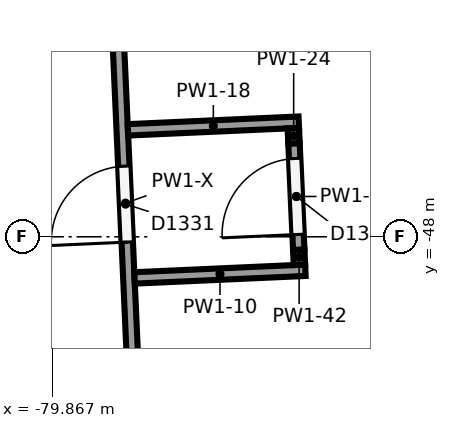
"""IFC4 building model, lengths in metres.
Left out: names, types, materials, properties, quantities, classifications, styles, units other than length and angle.
Written with IfcOpenShell. Run it as: python <this file> out.ifc"""

import sys

from ifc_helpers import new_model, si_unit, direction, frame, frame_2d, origin, place, context, subcontext, project, spatial, rectangle, extrude, element, fill, save


model = new_model("IFC4")
c1 = context("Model", 3, precision=1e-05, world=origin(), true_north=direction((0.0, 1.0)))
c2 = subcontext(c1, "Body", "Model", "MODEL_VIEW")
j1 = project(units=[si_unit("LENGTHUNIT", "METRE"), si_unit("PLANEANGLEUNIT", "RADIAN")], contexts=[c1])
p1 = place(None, origin())
s1 = spatial("IfcSite", under=j1, at=p1, CompositionType="ELEMENT")
p2 = place(p1, origin())
s2 = spatial("IfcBuilding", under=s1, at=p2, CompositionType="ELEMENT")
p3 = place(p2, frame((0.0, 0.0, 18.0)))
s3 = spatial("IfcBuildingStorey", under=s2, at=p3, CompositionType="ELEMENT", Elevation=18.0)
p4 = place(p3, frame((-78.691, -52.266, 0.0), z_axis=(0.0, 0.0, 1.0), x_axis=(-0.044749816806, 0.998998225172, 0.0)))
e1 = element("IfcWall", 1, at=p4, inside=s3, PredefinedType="PARTITIONING", context=c2, shape_type="SweptSolid", body=[
    extrude(rectangle(XDim=9.427, YDim=0.15, at=frame_2d((4.714, 0.0))), origin(), (0.0, 0.0, 1.0), 3.332),
])
p5 = place(p4, frame((4.2, 0.0, 0.0)))
e2 = element("IfcOpeningElement", 2, at=p5, cuts=e1, PredefinedType="OPENING", context=c2, shape_type="SweptSolid", body=[
    extrude(rectangle(XDim=1.0, YDim=2.1, at=frame_2d((0.5, 1.05))), frame((0.0, 0.085, 0.0), z_axis=(0.0, -1.0, 0.0), x_axis=(1.0, 0.0, 0.0)), (0.0, 0.0, 1.0), 0.17),
])
p6 = place(p3, frame((-78.783, -48.541, 0.0), z_axis=(0.0, 0.0, 1.0), x_axis=(0.998995432738, 0.044812111841, 0.0)))
e3 = element("IfcWall", 3, at=p6, inside=s3, PredefinedType="PARTITIONING", context=c2, shape_type="SweptSolid", body=[
    extrude(rectangle(XDim=2.25, YDim=0.15, at=frame_2d((1.125, 0.0))), origin(), (0.0, 0.0, 1.0), 5.691),
])
p7 = place(p3, frame((-78.871, -46.593, 0.0), z_axis=(0.0, 0.0, 1.0), x_axis=(0.999000284298, 0.044703825039, 0.0)))
e4 = element("IfcWall", 4, at=p7, inside=s3, PredefinedType="PARTITIONING", context=c2, shape_type="SweptSolid", body=[
    extrude(rectangle(XDim=2.25, YDim=0.15, at=frame_2d((1.125, 0.0))), origin(), (0.0, 0.0, 1.0), 5.601),
])
p8 = place(p3, frame((-76.614, -48.369, 0.0), z_axis=(0.0, 0.0, 1.0), x_axis=(-0.04518607304, 0.99897858776, 0.0)))
e5 = element("IfcWall", 5, at=p8, inside=s3, PredefinedType="PARTITIONING", context=c2, shape_type="SweptSolid", body=[
    extrude(rectangle(XDim=0.2, YDim=0.15, at=frame_2d((0.1, 0.0))), origin(), (0.0, 0.0, 1.0), 5.698),
])
p9 = place(p3, frame((-76.623, -48.169, 0.0), z_axis=(0.0, 0.0, 1.0), x_axis=(-0.044640390809, 0.99900312087, 0.0)))
e6 = element("IfcWall", 6, at=p9, inside=s3, PredefinedType="PARTITIONING", context=c2, shape_type="SweptSolid", body=[
    extrude(rectangle(XDim=1.4, YDim=0.15, at=frame_2d((0.7, 0.0))), origin(), (0.0, 0.0, 1.0), 5.661),
])
p10 = place(p9, frame((0.2, 0.0, 0.0)))
e7 = element("IfcOpeningElement", 7, at=p10, cuts=e6, PredefinedType="OPENING", context=c2, shape_type="SweptSolid", body=[
    extrude(rectangle(XDim=1.0, YDim=2.1, at=frame_2d((0.5, 1.05))), frame((0.0, 0.085, 0.0), z_axis=(0.0, -1.0, 0.0), x_axis=(1.0, 0.0, 0.0)), (0.0, 0.0, 1.0), 0.17),
])
p11 = place(p3, frame((-76.685, -46.771, 0.0), z_axis=(0.0, 0.0, 1.0), x_axis=(-0.04518607304, 0.99897858776, 0.0)))
e8 = element("IfcWall", 8, at=p11, inside=s3, PredefinedType="PARTITIONING", context=c2, shape_type="SweptSolid", body=[
    extrude(rectangle(XDim=0.2, YDim=0.15, at=frame_2d((0.1, 0.0))), origin(), (0.0, 0.0, 1.0), 5.651),
])
p12 = place(p5, origin())
e9 = element("IfcDoor", 9, at=p12, inside=s3, OperationType="SINGLE_SWING_LEFT", PredefinedType="DOOR", context=c2, shape_type="SweptSolid", body=[
    extrude(rectangle(XDim=1.0, YDim=2.1, at=frame_2d((0.5, 1.05))), frame((0.0, 0.025, 0.0), z_axis=(0.0, -1.0, 0.0), x_axis=(1.0, 0.0, 0.0)), (0.0, 0.0, 1.0), 0.05),
])
fill(e2, e9)
p13 = place(p10, origin())
e10 = element("IfcDoor", 10, at=p13, inside=s3, OperationType="SINGLE_SWING_LEFT", PredefinedType="DOOR", context=c2, shape_type="SweptSolid", body=[
    extrude(rectangle(XDim=1.0, YDim=2.1, at=frame_2d((0.5, 1.05))), frame((0.0, 0.025, 0.0), z_axis=(0.0, -1.0, 0.0), x_axis=(1.0, 0.0, 0.0)), (0.0, 0.0, 1.0), 0.05),
])
fill(e7, e10)
save(model, sys.argv[1])
